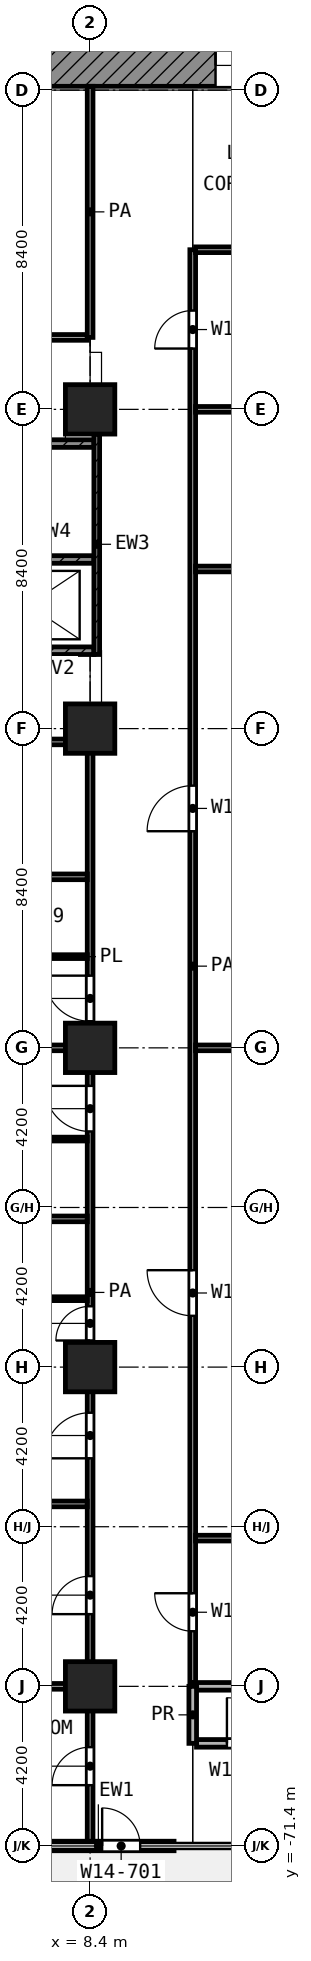
"""IFC4 building model, lengths in metres.
Left out: names, types, materials, properties, quantities, classifications, styles, units other than length and angle.
Written with IfcOpenShell. Run it as: python <this file> out.ifc"""

import sys

from ifc_helpers import new_model, si_unit, direction, frame, frame_2d, origin, origin_2d, place, context, subcontext, project, spatial, rectangle, extrude, element, fill, save


model = new_model("IFC4")
c1 = context("Model", 3, precision=1e-05, world=origin(), true_north=direction((0.0, 1.0)))
c2 = subcontext(c1, "Body", "Model", "MODEL_VIEW")
j1 = project(units=[si_unit("LENGTHUNIT", "METRE"), si_unit("PLANEANGLEUNIT", "RADIAN")], contexts=[c1])
p1 = place(None, origin())
s1 = spatial("IfcSite", under=j1, at=p1, CompositionType="ELEMENT")
p2 = place(p1, origin())
s2 = spatial("IfcBuilding", under=s1, at=p2, CompositionType="ELEMENT")
p3 = place(p2, frame((0.0, 0.0, 64.4)))
s3 = spatial("IfcBuildingStorey", under=s2, at=p3, CompositionType="ELEMENT", Elevation=64.4)
for number, where, z_axis, x_axis in (
    (1, (8.4, -33.6, 0.0), (0.0, 0.0, 1.0), (1.0, 0.0, 0.0)),
    (2, (8.4, -42.0, 0.0), (0.0, 0.0, 1.0), (1.0, 0.0, 0.0)),
    (3, (8.4, -50.4, 0.0), (0.0, 0.0, 1.0), (1.0, 0.0, 0.0)),
    (4, (8.4, -58.8, 0.0), (0.0, 0.0, 1.0), (1.0, 0.0, 0.0)),
    (5, (8.4, -67.2, 0.0), (0.0, 0.0, 1.0), (1.0, 0.0, 0.0)),
):
    element("IfcColumn", number, at=place(p3, frame(where, z_axis=z_axis, x_axis=x_axis)), inside=s3, PredefinedType="COLUMN", context=c2, shape_type="SweptSolid", body=[
        extrude(rectangle(XDim=1.3, YDim=1.3, at=origin_2d()), origin(), (0.0, 0.0, 1.0), 4.2),
    ])
p4 = place(p3, frame((6.625, -71.4, 0.0), z_axis=(0.0, 0.0, 1.0), x_axis=(1.0, 0.0, 0.0)))
e6 = element("IfcWall", 6, at=p4, inside=s3, PredefinedType="SOLIDWALL", context=c2, shape_type="SweptSolid", body=[
    extrude(rectangle(XDim=3.983, YDim=0.25, at=frame_2d((1.992, 0.0))), origin(), (0.0, 0.0, 1.0), 3.78),
])
p5 = place(p4, frame((2.092, 0.0, 0.0)))
e7 = element("IfcOpeningElement", 7, at=p5, cuts=e6, PredefinedType="OPENING", context=c2, shape_type="SweptSolid", body=[
    extrude(rectangle(XDim=1.0, YDim=2.1, at=frame_2d((0.5, 1.05))), frame((0.0, 0.135, 0.0), z_axis=(0.0, -1.0, 0.0), x_axis=(1.0, 0.0, 0.0)), (0.0, 0.0, 1.0), 0.27),
])
p6 = place(p3, frame((5.4, -24.55, 0.0), z_axis=(0.0, 0.0, 1.0), x_axis=(1.0, 0.0, 0.0)))
e8 = element("IfcWall", 8, at=p6, inside=s3, PredefinedType="SHEAR", context=c2, shape_type="SweptSolid", body=[
    extrude(rectangle(XDim=18.6, YDim=1.1, at=frame_2d((9.3, 0.0))), origin(), (0.0, 0.0, 1.0), 3.9),
])
p7 = place(p6, frame((6.3, 0.0, 0.0)))
e9 = element("IfcOpeningElement", 9, at=p7, cuts=e8, PredefinedType="OPENING", context=c2, shape_type="SweptSolid", body=[
    extrude(rectangle(XDim=1.8, YDim=2.1, at=frame_2d((0.9, 1.05))), frame((0.0, 0.56, 0.0), z_axis=(0.0, -1.0, 0.0), x_axis=(1.0, 0.0, 0.0)), (0.0, 0.0, 1.0), 1.12),
])
p8 = place(p3, frame((8.575, -40.05, 0.0), z_axis=(0.0, 0.0, 1.0), x_axis=(0.0, 1.0, 0.0)))
e10 = element("IfcWall", 10, at=p8, inside=s3, PredefinedType="SHEAR", context=c2, shape_type="SweptSolid", body=[
    extrude(rectangle(XDim=5.8, YDim=0.15, at=frame_2d((2.9, 0.0))), origin(), (0.0, 0.0, 1.0), 3.9),
])
p9 = place(p3, frame((0.45, -34.5, 0.0), z_axis=(0.0, 0.0, 1.0), x_axis=(1.0, 0.0, 0.0)))
e11 = element("IfcWall", 11, at=p9, inside=s3, PredefinedType="SHEAR", context=c2, shape_type="SweptSolid", body=[
    extrude(rectangle(XDim=8.05, YDim=0.2, at=frame_2d((4.025, 0.0))), origin(), (0.0, 0.0, 1.0), 3.9),
])
p10 = place(p9, frame((0.75, 0.0, 0.0)))
e12 = element("IfcOpeningElement", 12, at=p10, cuts=e11, PredefinedType="OPENING", context=c2, shape_type="SweptSolid", body=[
    extrude(rectangle(XDim=1.1, YDim=2.1, at=frame_2d((0.55, 1.05))), frame((0.0, 0.11, 0.0), z_axis=(0.0, -1.0, 0.0), x_axis=(1.0, 0.0, 0.0)), (0.0, 0.0, 1.0), 0.22),
])
p11 = place(p3, frame((0.45, -37.55, 0.0), z_axis=(0.0, 0.0, 1.0), x_axis=(1.0, 0.0, 0.0)))
e13 = element("IfcWall", 13, at=p11, inside=s3, PredefinedType="SHEAR", context=c2, shape_type="SweptSolid", body=[
    extrude(rectangle(XDim=8.05, YDim=0.2, at=frame_2d((4.025, 0.0))), origin(), (0.0, 0.0, 1.0), 3.9),
])
p12 = place(p11, frame((0.1, 0.0, 0.0)))
e14 = element("IfcOpeningElement", 14, at=p12, cuts=e13, PredefinedType="OPENING", context=c2, shape_type="SweptSolid", body=[
    extrude(rectangle(XDim=1.1, YDim=2.1, at=frame_2d((0.55, 1.05))), frame((0.0, 0.11, 0.0), z_axis=(0.0, -1.0, 0.0), x_axis=(1.0, 0.0, 0.0)), (0.0, 0.0, 1.0), 0.22),
])
p13 = place(p3, frame((0.45, -39.95, 0.0), z_axis=(0.0, 0.0, 1.0), x_axis=(1.0, 0.0, 0.0)))
e15 = element("IfcWall", 15, at=p13, inside=s3, PredefinedType="SHEAR", context=c2, shape_type="SweptSolid", body=[
    extrude(rectangle(XDim=8.05, YDim=0.2, at=frame_2d((4.025, 0.0))), origin(), (0.0, 0.0, 1.0), 3.9),
])
p14 = place(p13, frame((2.0, 0.0, 0.0)))
e16 = element("IfcOpeningElement", 16, at=p14, cuts=e15, PredefinedType="OPENING", context=c2, shape_type="SweptSolid", body=[
    extrude(rectangle(XDim=1.1, YDim=2.1, at=frame_2d((0.55, 1.05))), frame((0.0, 0.11, 0.0), z_axis=(0.0, -1.0, 0.0), x_axis=(1.0, 0.0, 0.0)), (0.0, 0.0, 1.0), 0.22),
])
p15 = place(p3, frame((5.751, -57.0, 0.0), z_axis=(0.0, 0.0, 1.0), x_axis=(1.0, 0.0, 0.0)))
e17 = element("IfcWall", 17, at=p15, inside=s3, PredefinedType="PARTITIONING", context=c2, shape_type="SweptSolid", body=[
    extrude(rectangle(XDim=2.574, YDim=0.1, at=frame_2d((1.287, 0.0))), origin(), (0.0, 0.0, 1.0), 3.9),
])
for number, where, z_axis, x_axis in (
    (18, (5.15, -52.8, 0.0), (0.0, 0.0, 1.0), (1.0, 0.0, 0.0)),
    (19, (5.15, -48.0, 0.0), (0.0, 0.0, 1.0), (1.0, 0.0, 0.0)),
):
    element("IfcWall", number, at=place(p3, frame(where, z_axis=z_axis, x_axis=x_axis)), inside=s3, PredefinedType="PARTITIONING", context=c2, shape_type="SweptSolid", body=[
        extrude(rectangle(XDim=3.175, YDim=0.1, at=frame_2d((1.587, 0.0))), origin(), (0.0, 0.0, 1.0), 3.9),
    ])
p16 = place(p3, frame((1.913, -67.2, 0.0), z_axis=(0.0, 0.0, 1.0), x_axis=(1.0, 0.0, 0.0)))
e20 = element("IfcWall", 20, at=p16, inside=s3, PredefinedType="PARTITIONING", context=c2, shape_type="SweptSolid", body=[
    extrude(rectangle(XDim=6.412, YDim=0.15, at=frame_2d((3.206, 0.0))), origin(), (0.0, 0.0, 1.0), 3.9),
])
p17 = place(p3, frame((11.175, -63.3, 0.0), z_axis=(0.0, 0.0, 1.0), x_axis=(1.0, 0.0, 0.0)))
e21 = element("IfcWall", 21, at=p17, inside=s3, PredefinedType="PARTITIONING", context=c2, shape_type="SweptSolid", body=[
    extrude(rectangle(XDim=2.85, YDim=0.15, at=frame_2d((1.425, 0.0))), origin(), (0.0, 0.0, 1.0), 3.9),
])
for number, where, z_axis, x_axis in (
    (22, (0.08, -62.4, 0.0), (0.0, 0.0, 1.0), (1.0, 0.0, 0.0)),
    (23, (0.08, -54.9, 0.0), (0.0, 0.0, 1.0), (1.0, 0.0, 0.0)),
    (24, (0.08, -50.4, 0.0), (0.0, 0.0, 1.0), (1.0, 0.0, 0.0)),
):
    element("IfcWall", number, at=place(p3, frame(where, z_axis=z_axis, x_axis=x_axis)), inside=s3, PredefinedType="PARTITIONING", context=c2, shape_type="SweptSolid", body=[
        extrude(rectangle(XDim=8.245, YDim=0.15, at=frame_2d((4.123, 0.0))), origin(), (0.0, 0.0, 1.0), 3.9),
    ])
p18 = place(p3, frame((11.175, -50.4, 0.0), z_axis=(0.0, 0.0, 1.0), x_axis=(1.0, 0.0, 0.0)))
e25 = element("IfcWall", 25, at=p18, inside=s3, PredefinedType="PARTITIONING", context=c2, shape_type="SweptSolid", body=[
    extrude(rectangle(XDim=2.85, YDim=0.15, at=frame_2d((1.425, 0.0))), origin(), (0.0, 0.0, 1.0), 3.9),
])
p19 = place(p3, frame((0.08, -45.9, 0.0), z_axis=(0.0, 0.0, 1.0), x_axis=(1.0, 0.0, 0.0)))
e26 = element("IfcWall", 26, at=p19, inside=s3, PredefinedType="PARTITIONING", context=c2, shape_type="SweptSolid", body=[
    extrude(rectangle(XDim=8.245, YDim=0.15, at=frame_2d((4.123, 0.0))), origin(), (0.0, 0.0, 1.0), 3.9),
])
p20 = place(p3, frame((2.326, -42.35, 0.0), z_axis=(0.0, 0.0, 1.0), x_axis=(1.0, 0.0, 0.0)))
e27 = element("IfcWall", 27, at=p20, inside=s3, PredefinedType="PARTITIONING", context=c2, shape_type="SweptSolid", body=[
    extrude(rectangle(XDim=5.999, YDim=0.15, at=frame_2d((3.0, 0.0))), origin(), (0.0, 0.0, 1.0), 3.9),
])
p21 = place(p20, frame((2.499, 0.0, 0.0)))
e28 = element("IfcOpeningElement", 28, at=p21, cuts=e27, PredefinedType="OPENING", context=c2, shape_type="SweptSolid", body=[
    extrude(rectangle(XDim=1.0, YDim=2.1, at=frame_2d((0.5, 1.05))), frame((0.0, 0.085, 0.0), z_axis=(0.0, -1.0, 0.0), x_axis=(1.0, 0.0, 0.0)), (0.0, 0.0, 1.0), 0.17),
])
for number, where, z_axis, x_axis in (
    (29, (11.175, -37.8, 0.0), (0.0, 0.0, 1.0), (1.0, 0.0, 0.0)),
    (30, (11.175, -33.6, 0.0), (0.0, 0.0, 1.0), (1.0, 0.0, 0.0)),
):
    element("IfcWall", number, at=place(p3, frame(where, z_axis=z_axis, x_axis=x_axis)), inside=s3, PredefinedType="PARTITIONING", context=c2, shape_type="SweptSolid", body=[
        extrude(rectangle(XDim=2.85, YDim=0.15, at=frame_2d((1.425, 0.0))), origin(), (0.0, 0.0, 1.0), 3.9),
    ])
p22 = place(p3, frame((1.078, -31.707, 0.0), z_axis=(0.0, 0.0, 1.0), x_axis=(1.0, 0.0, 0.0)))
e31 = element("IfcWall", 31, at=p22, inside=s3, PredefinedType="PARTITIONING", context=c2, shape_type="SweptSolid", body=[
    extrude(rectangle(XDim=7.247, YDim=0.15, at=frame_2d((3.624, 0.0))), origin(), (0.0, 0.0, 1.0), 3.9),
])
p23 = place(p22, frame((2.873, 0.0, 0.0)))
e32 = element("IfcOpeningElement", 32, at=p23, cuts=e31, PredefinedType="OPENING", context=c2, shape_type="SweptSolid", body=[
    extrude(rectangle(XDim=1.5, YDim=2.1, at=frame_2d((0.75, 1.05))), frame((0.0, 0.085, 0.0), z_axis=(0.0, -1.0, 0.0), x_axis=(1.0, 0.0, 0.0)), (0.0, 0.0, 1.0), 0.17),
])
p24 = place(p3, frame((11.175, -29.4, 0.0), z_axis=(0.0, 0.0, 1.0), x_axis=(1.0, 0.0, 0.0)))
e33 = element("IfcWall", 33, at=p24, inside=s3, PredefinedType="PARTITIONING", context=c2, shape_type="SweptSolid", body=[
    extrude(rectangle(XDim=2.85, YDim=0.15, at=frame_2d((1.425, 0.0))), origin(), (0.0, 0.0, 1.0), 3.9),
])
p25 = place(p3, frame((8.4, -71.32, 0.0), z_axis=(0.0, 0.0, 1.0), x_axis=(0.0, 1.0, 0.0)))
e34 = element("IfcWall", 34, at=p25, inside=s3, PredefinedType="PARTITIONING", context=c2, shape_type="SweptSolid", body=[
    extrude(rectangle(XDim=28.97, YDim=0.15, at=frame_2d((14.485, 0.0))), origin(), (0.0, 0.0, 1.0), 3.9),
])
p26 = place(p25, frame((21.62, 0.0, 0.0)))
e35 = element("IfcOpeningElement", 35, at=p26, cuts=e34, PredefinedType="OPENING", context=c2, shape_type="SweptSolid", body=[
    extrude(rectangle(XDim=1.2, YDim=2.1, at=frame_2d((0.6, 1.05))), frame((0.0, 0.085, 0.0), z_axis=(0.0, -1.0, 0.0), x_axis=(1.0, 0.0, 0.0)), (0.0, 0.0, 1.0), 0.17),
])
p27 = place(p25, frame((18.72, 0.0, 0.0)))
e36 = element("IfcOpeningElement", 36, at=p27, cuts=e34, PredefinedType="OPENING", context=c2, shape_type="SweptSolid", body=[
    extrude(rectangle(XDim=1.2, YDim=2.1, at=frame_2d((0.6, 1.05))), frame((0.0, 0.085, 0.0), z_axis=(0.0, -1.0, 0.0), x_axis=(1.0, 0.0, 0.0)), (0.0, 0.0, 1.0), 0.17),
])
p28 = place(p25, frame((10.12, 0.0, 0.0)))
e37 = element("IfcOpeningElement", 37, at=p28, cuts=e34, PredefinedType="OPENING", context=c2, shape_type="SweptSolid", body=[
    extrude(rectangle(XDim=1.2, YDim=2.1, at=frame_2d((0.6, 1.05))), frame((0.0, 0.085, 0.0), z_axis=(0.0, -1.0, 0.0), x_axis=(1.0, 0.0, 0.0)), (0.0, 0.0, 1.0), 0.17),
])
p29 = place(p25, frame((13.22, 0.0, 0.0)))
e38 = element("IfcOpeningElement", 38, at=p29, cuts=e34, PredefinedType="OPENING", context=c2, shape_type="SweptSolid", body=[
    extrude(rectangle(XDim=0.9, YDim=2.1, at=frame_2d((0.45, 1.05))), frame((0.0, 0.085, 0.0), z_axis=(0.0, -1.0, 0.0), x_axis=(1.0, 0.0, 0.0)), (0.0, 0.0, 1.0), 0.17),
])
p30 = place(p25, frame((6.02, 0.0, 0.0)))
e39 = element("IfcOpeningElement", 39, at=p30, cuts=e34, PredefinedType="OPENING", context=c2, shape_type="SweptSolid", body=[
    extrude(rectangle(XDim=1.0, YDim=2.1, at=frame_2d((0.5, 1.05))), frame((0.0, 0.085, 0.0), z_axis=(0.0, -1.0, 0.0), x_axis=(1.0, 0.0, 0.0)), (0.0, 0.0, 1.0), 0.17),
])
p31 = place(p25, frame((1.52, 0.0, 0.0)))
e40 = element("IfcOpeningElement", 40, at=p31, cuts=e34, PredefinedType="OPENING", context=c2, shape_type="SweptSolid", body=[
    extrude(rectangle(XDim=1.0, YDim=2.1, at=frame_2d((0.5, 1.05))), frame((0.0, 0.085, 0.0), z_axis=(0.0, -1.0, 0.0), x_axis=(1.0, 0.0, 0.0)), (0.0, 0.0, 1.0), 0.17),
])
p32 = place(p3, frame((8.4, -31.707, 0.0), z_axis=(0.0, 0.0, 1.0), x_axis=(0.0, 1.0, 0.0)))
e41 = element("IfcWall", 41, at=p32, inside=s3, PredefinedType="PARTITIONING", context=c2, shape_type="SweptSolid", body=[
    extrude(rectangle(XDim=6.607, YDim=0.15, at=frame_2d((3.303, 0.0))), origin(), (0.0, 0.0, 1.0), 3.9),
])
p33 = place(p3, frame((11.1, -67.1, 0.0), z_axis=(0.0, 0.0, 1.0), x_axis=(0.0, 1.0, 0.0)))
e42 = element("IfcWall", 42, at=p33, inside=s3, PredefinedType="PARTITIONING", context=c2, shape_type="SweptSolid", body=[
    extrude(rectangle(XDim=37.7, YDim=0.15, at=frame_2d((18.85, 0.0))), origin(), (0.0, 0.0, 1.0), 3.9),
])
p34 = place(p33, frame((35.1, 0.0, 0.0)))
e43 = element("IfcOpeningElement", 43, at=p34, cuts=e42, PredefinedType="OPENING", context=c2, shape_type="SweptSolid", body=[
    extrude(rectangle(XDim=1.0, YDim=2.1, at=frame_2d((0.5, 1.05))), frame((0.0, 0.085, 0.0), z_axis=(0.0, -1.0, 0.0), x_axis=(1.0, 0.0, 0.0)), (0.0, 0.0, 1.0), 0.17),
])
p35 = place(p33, frame((22.4, 0.0, 0.0)))
e44 = element("IfcOpeningElement", 44, at=p35, cuts=e42, PredefinedType="OPENING", context=c2, shape_type="SweptSolid", body=[
    extrude(rectangle(XDim=1.2, YDim=2.1, at=frame_2d((0.6, 1.05))), frame((0.0, 0.085, 0.0), z_axis=(0.0, -1.0, 0.0), x_axis=(1.0, 0.0, 0.0)), (0.0, 0.0, 1.0), 0.17),
])
p36 = place(p33, frame((9.65, 0.0, 0.0)))
e45 = element("IfcOpeningElement", 45, at=p36, cuts=e42, PredefinedType="OPENING", context=c2, shape_type="SweptSolid", body=[
    extrude(rectangle(XDim=1.2, YDim=2.1, at=frame_2d((0.6, 1.05))), frame((0.0, 0.085, 0.0), z_axis=(0.0, -1.0, 0.0), x_axis=(1.0, 0.0, 0.0)), (0.0, 0.0, 1.0), 0.17),
])
p37 = place(p33, frame((1.35, 0.0, 0.0)))
e46 = element("IfcOpeningElement", 46, at=p37, cuts=e42, PredefinedType="OPENING", context=c2, shape_type="SweptSolid", body=[
    extrude(rectangle(XDim=1.0, YDim=2.1, at=frame_2d((0.5, 1.05))), frame((0.0, 0.085, 0.0), z_axis=(0.0, -1.0, 0.0), x_axis=(1.0, 0.0, 0.0)), (0.0, 0.0, 1.0), 0.17),
])
p38 = place(p3, frame((11.2, -68.7, 0.0), z_axis=(0.0, 0.0, 1.0), x_axis=(1.0, 0.0, 0.0)))
e47 = element("IfcWall", 47, at=p38, inside=s3, PredefinedType="PARTITIONING", context=c2, shape_type="SweptSolid", body=[
    extrude(rectangle(XDim=2.8, YDim=0.2, at=frame_2d((1.4, 0.0))), origin(), (0.0, 0.0, 1.0), 3.9),
])
p39 = place(p38, frame((0.8, 0.0, 0.0)))
e48 = element("IfcOpeningElement", 48, at=p39, cuts=e47, PredefinedType="OPENING", context=c2, shape_type="SweptSolid", body=[
    extrude(rectangle(XDim=1.2, YDim=2.1, at=frame_2d((0.6, 1.05))), frame((0.0, 0.11, 0.0), z_axis=(0.0, -1.0, 0.0), x_axis=(1.0, 0.0, 0.0)), (0.0, 0.0, 1.0), 0.22),
])
p40 = place(p3, frame((11.2, -67.2, 0.0), z_axis=(0.0, 0.0, 1.0), x_axis=(1.0, 0.0, 0.0)))
e49 = element("IfcWall", 49, at=p40, inside=s3, PredefinedType="PARTITIONING", context=c2, shape_type="SweptSolid", body=[
    extrude(rectangle(XDim=2.8, YDim=0.2, at=frame_2d((1.4, 0.0))), origin(), (0.0, 0.0, 1.0), 3.9),
])
p41 = place(p3, frame((11.1, -68.7, 0.0), z_axis=(0.0, 0.0, 1.0), x_axis=(0.0, 1.0, 0.0)))
e50 = element("IfcWall", 50, at=p41, inside=s3, PredefinedType="PARTITIONING", context=c2, shape_type="SweptSolid", body=[
    extrude(rectangle(XDim=1.5, YDim=0.2, at=frame_2d((0.75, 0.0))), origin(), (0.0, 0.0, 1.0), 3.9),
])
p42 = place(p5, origin())
e51 = element("IfcDoor", 51, at=p42, inside=s3, OperationType="SINGLE_SWING_LEFT", PredefinedType="DOOR", context=c2, shape_type="SweptSolid", body=[
    extrude(rectangle(XDim=1.0, YDim=2.1, at=frame_2d((0.5, 1.05))), frame((0.0, 0.025, 0.0), z_axis=(0.0, -1.0, 0.0), x_axis=(1.0, 0.0, 0.0)), (0.0, 0.0, 1.0), 0.05),
])
fill(e7, e51)
p43 = place(p7, origin())
e52 = element("IfcDoor", 52, at=p43, inside=s3, OperationType="DOUBLE_DOOR_SINGLE_SWING", PredefinedType="DOOR", context=c2, shape_type="SweptSolid", body=[
    extrude(rectangle(XDim=1.8, YDim=2.1, at=frame_2d((0.9, 1.05))), frame((0.0, 0.025, 0.0), z_axis=(0.0, -1.0, 0.0), x_axis=(1.0, 0.0, 0.0)), (0.0, 0.0, 1.0), 0.05),
])
fill(e9, e52)
p44 = place(p26, origin())
e53 = element("IfcDoor", 53, at=p44, inside=s3, OperationType="SINGLE_SWING_RIGHT", PredefinedType="DOOR", context=c2, shape_type="SweptSolid", body=[
    extrude(rectangle(XDim=1.2, YDim=2.1, at=frame_2d((0.6, 1.05))), frame((0.0, 0.025, 0.0), z_axis=(0.0, -1.0, 0.0), x_axis=(1.0, 0.0, 0.0)), (0.0, 0.0, 1.0), 0.05),
])
fill(e35, e53)
p45 = place(p27, origin())
e54 = element("IfcDoor", 54, at=p45, inside=s3, OperationType="SINGLE_SWING_RIGHT", PredefinedType="DOOR", context=c2, shape_type="SweptSolid", body=[
    extrude(rectangle(XDim=1.2, YDim=2.1, at=frame_2d((0.6, 1.05))), frame((0.0, 0.025, 0.0), z_axis=(0.0, -1.0, 0.0), x_axis=(1.0, 0.0, 0.0)), (0.0, 0.0, 1.0), 0.05),
])
fill(e36, e54)
p46 = place(p28, origin())
e55 = element("IfcDoor", 55, at=p46, inside=s3, OperationType="SINGLE_SWING_LEFT", PredefinedType="DOOR", context=c2, shape_type="SweptSolid", body=[
    extrude(rectangle(XDim=1.2, YDim=2.1, at=frame_2d((0.6, 1.05))), frame((0.0, 0.025, 0.0), z_axis=(0.0, -1.0, 0.0), x_axis=(1.0, 0.0, 0.0)), (0.0, 0.0, 1.0), 0.05),
])
fill(e37, e55)
p47 = place(p29, origin())
e56 = element("IfcDoor", 56, at=p47, inside=s3, OperationType="SINGLE_SWING_LEFT", PredefinedType="DOOR", context=c2, shape_type="SweptSolid", body=[
    extrude(rectangle(XDim=0.9, YDim=2.1, at=frame_2d((0.45, 1.05))), frame((0.0, 0.025, 0.0), z_axis=(0.0, -1.0, 0.0), x_axis=(1.0, 0.0, 0.0)), (0.0, 0.0, 1.0), 0.05),
])
fill(e38, e56)
p48 = place(p30, origin())
e57 = element("IfcDoor", 57, at=p48, inside=s3, OperationType="SINGLE_SWING_LEFT", PredefinedType="DOOR", context=c2, shape_type="SweptSolid", body=[
    extrude(rectangle(XDim=1.0, YDim=2.1, at=frame_2d((0.5, 1.05))), frame((0.0, 0.025, 0.0), z_axis=(0.0, -1.0, 0.0), x_axis=(1.0, 0.0, 0.0)), (0.0, 0.0, 1.0), 0.05),
])
fill(e39, e57)
p49 = place(p31, origin())
e58 = element("IfcDoor", 58, at=p49, inside=s3, OperationType="SINGLE_SWING_LEFT", PredefinedType="DOOR", context=c2, shape_type="SweptSolid", body=[
    extrude(rectangle(XDim=1.0, YDim=2.1, at=frame_2d((0.5, 1.05))), frame((0.0, 0.025, 0.0), z_axis=(0.0, -1.0, 0.0), x_axis=(1.0, 0.0, 0.0)), (0.0, 0.0, 1.0), 0.05),
])
fill(e40, e58)
p50 = place(p34, origin())
e59 = element("IfcDoor", 59, at=p50, inside=s3, OperationType="SINGLE_SWING_LEFT", PredefinedType="DOOR", context=c2, shape_type="SweptSolid", body=[
    extrude(rectangle(XDim=1.0, YDim=2.1, at=frame_2d((0.5, 1.05))), frame((0.0, 0.025, 0.0), z_axis=(0.0, -1.0, 0.0), x_axis=(1.0, 0.0, 0.0)), (0.0, 0.0, 1.0), 0.05),
])
fill(e43, e59)
p51 = place(p35, origin())
e60 = element("IfcDoor", 60, at=p51, inside=s3, OperationType="SINGLE_SWING_LEFT", PredefinedType="DOOR", context=c2, shape_type="SweptSolid", body=[
    extrude(rectangle(XDim=1.2, YDim=2.1, at=frame_2d((0.6, 1.05))), frame((0.0, 0.025, 0.0), z_axis=(0.0, -1.0, 0.0), x_axis=(1.0, 0.0, 0.0)), (0.0, 0.0, 1.0), 0.05),
])
fill(e44, e60)
p52 = place(p36, origin())
e61 = element("IfcDoor", 61, at=p52, inside=s3, OperationType="SINGLE_SWING_RIGHT", PredefinedType="DOOR", context=c2, shape_type="SweptSolid", body=[
    extrude(rectangle(XDim=1.2, YDim=2.1, at=frame_2d((0.6, 1.05))), frame((0.0, 0.025, 0.0), z_axis=(0.0, -1.0, 0.0), x_axis=(1.0, 0.0, 0.0)), (0.0, 0.0, 1.0), 0.05),
])
fill(e45, e61)
p53 = place(p37, origin())
e62 = element("IfcDoor", 62, at=p53, inside=s3, OperationType="SINGLE_SWING_RIGHT", PredefinedType="DOOR", context=c2, shape_type="SweptSolid", body=[
    extrude(rectangle(XDim=1.0, YDim=2.1, at=frame_2d((0.5, 1.05))), frame((0.0, 0.025, 0.0), z_axis=(0.0, -1.0, 0.0), x_axis=(1.0, 0.0, 0.0)), (0.0, 0.0, 1.0), 0.05),
])
fill(e46, e62)
p54 = place(p39, origin())
e63 = element("IfcDoor", 63, at=p54, inside=s3, OperationType="SINGLE_SWING_LEFT", PredefinedType="DOOR", context=c2, shape_type="SweptSolid", body=[
    extrude(rectangle(XDim=1.2, YDim=2.1, at=frame_2d((0.6, 1.05))), frame((0.0, 0.025, 0.0), z_axis=(0.0, -1.0, 0.0), x_axis=(1.0, 0.0, 0.0)), (0.0, 0.0, 1.0), 0.05),
])
fill(e48, e63)
save(model, sys.argv[1])
